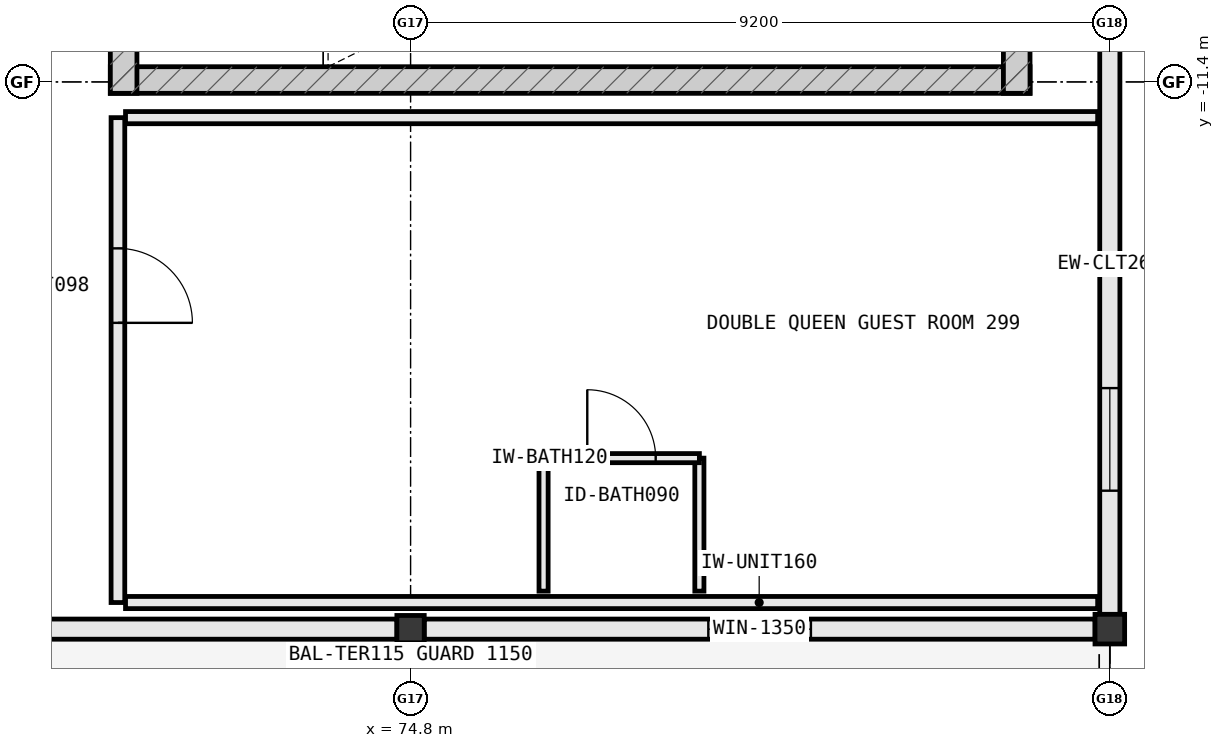
"""IFC4 building model, lengths in metres.
Left out: names, types, materials, properties, quantities, classifications, styles, units other than length and angle.
Written with IfcOpenShell. Run it as: python <this file> out.ifc"""

import sys

from ifc_helpers import new_model, si_unit, direction, frame, frame_2d, origin, origin_2d, place, context, subcontext, project, spatial, rectangle, extrude, element, fill, save


model = new_model("IFC4")
c1 = context("Model", 3, precision=1e-05, world=origin(), true_north=direction((0.0, 1.0)))
c2 = subcontext(c1, "Body", "Model", "MODEL_VIEW")
j1 = project(units=[si_unit("LENGTHUNIT", "METRE"), si_unit("PLANEANGLEUNIT", "RADIAN")], contexts=[c1])
p1 = place(None, origin())
s1 = spatial("IfcSite", under=j1, at=p1, CompositionType="ELEMENT")
p2 = place(p1, origin())
s2 = spatial("IfcBuilding", under=s1, at=p2, CompositionType="ELEMENT")
p3 = place(p2, frame((0.0, 0.0, 46.6)))
s3 = spatial("IfcBuildingStorey", under=s2, at=p3, CompositionType="ELEMENT", Elevation=46.6)
p4 = place(p3, frame((74.8, -18.6, 0.0), z_axis=(0.0, 0.0, 1.0), x_axis=(1.0, 0.0, 0.0)))
e1 = element("IfcColumn", 1, at=p4, inside=s3, PredefinedType="COLUMN", context=c2, shape_type="SweptSolid", body=[
    extrude(rectangle(XDim=0.36, YDim=0.36, at=origin_2d()), origin(), (0.0, 0.0, 1.0), 4.2),
])
p5 = place(p3, frame((84.0, -18.6, 0.0), z_axis=(0.0, 0.0, 1.0), x_axis=(1.0, 0.0, 0.0)))
e2 = element("IfcColumn", 2, at=p5, inside=s3, PredefinedType="COLUMN", context=c2, shape_type="SweptSolid", body=[
    extrude(rectangle(XDim=0.39, YDim=0.39, at=origin_2d()), origin(), (0.0, 0.0, 1.0), 4.2),
])
p6 = place(p3, frame((65.808, -18.6, 0.0), z_axis=(0.0, 0.0, 1.0), x_axis=(1.0, 0.0, 0.0)))
e3 = element("IfcWall", 3, at=p6, inside=s3, PredefinedType="STANDARD", context=c2, shape_type="SweptSolid", body=[
    extrude(rectangle(XDim=8.814, YDim=0.265, at=frame_2d((4.407, 0.0))), origin(), (0.0, 0.0, 1.0), 3.99),
])
p7 = place(p6, frame((2.392, 0.0, 0.0)))
e4 = element("IfcOpeningElement", 4, at=p7, cuts=e3, PredefinedType="OPENING", context=c2, shape_type="SweptSolid", body=[
    extrude(rectangle(XDim=1.5, YDim=2.22, at=frame_2d((0.75, 1.11))), frame((0.0, 0.145, 0.0), z_axis=(0.0, -1.0, 0.0), x_axis=(1.0, 0.0, 0.0)), (0.0, 0.0, 1.0), 0.289),
])
p8 = place(p3, frame((74.978, -18.6, 0.0), z_axis=(0.0, 0.0, 1.0), x_axis=(1.0, 0.0, 0.0)))
e5 = element("IfcWall", 5, at=p8, inside=s3, PredefinedType="STANDARD", context=c2, shape_type="SweptSolid", body=[
    extrude(rectangle(XDim=8.829, YDim=0.265, at=frame_2d((4.415, 0.0))), origin(), (0.0, 0.0, 1.0), 3.99),
])
p9 = place(p8, frame((3.74, 0.0, 0.85)))
e6 = element("IfcOpeningElement", 6, at=p9, cuts=e5, PredefinedType="OPENING", context=c2, shape_type="SweptSolid", body=[
    extrude(rectangle(XDim=1.35, YDim=1.65, at=frame_2d((0.675, 0.825))), frame((0.0, 0.145, 0.0), z_axis=(0.0, -1.0, 0.0), x_axis=(1.0, 0.0, 0.0)), (0.0, 0.0, 1.0), 0.289),
])
p10 = place(p3, frame((84.0, -18.407, 0.0), z_axis=(0.0, 0.0, 1.0), x_axis=(0.0, 1.0, 0.0)))
e7 = element("IfcWall", 7, at=p10, inside=s3, PredefinedType="STANDARD", context=c2, shape_type="SweptSolid", body=[
    extrude(rectangle(XDim=9.214, YDim=0.265, at=frame_2d((4.607, 0.0))), origin(), (0.0, 0.0, 1.0), 3.99),
])
p11 = place(p10, frame((1.628, 0.0, 0.85)))
e8 = element("IfcOpeningElement", 8, at=p11, cuts=e7, PredefinedType="OPENING", context=c2, shape_type="SweptSolid", body=[
    extrude(rectangle(XDim=1.35, YDim=1.65, at=frame_2d((0.675, 0.825))), frame((0.0, 0.145, 0.0), z_axis=(0.0, -1.0, 0.0), x_axis=(1.0, 0.0, 0.0)), (0.0, 0.0, 1.0), 0.289),
])
p12 = place(p3, frame((70.85, -11.375, 0.0), z_axis=(0.0, 0.0, 1.0), x_axis=(1.0, 0.0, 0.0)))
e9 = element("IfcWall", 9, at=p12, inside=s3, PredefinedType="SHEAR", context=c2, shape_type="SweptSolid", body=[
    extrude(rectangle(XDim=12.1, YDim=0.35, at=frame_2d((6.05, 0.0))), origin(), (0.0, 0.0, 1.0), 3.99),
])
p13 = place(p3, frame((82.775, -11.55, 0.0), z_axis=(0.0, 0.0, 1.0), x_axis=(0.0, 1.0, 0.0)))
e10 = element("IfcWall", 10, at=p13, inside=s3, PredefinedType="SHEAR", context=c2, shape_type="SweptSolid", body=[
    extrude(rectangle(XDim=5.1, YDim=0.35, at=frame_2d((2.55, 0.0))), origin(), (0.0, 0.0, 1.0), 3.99),
])
p14 = place(p3, frame((71.025, -6.45, 0.0), z_axis=(0.0, 0.0, 1.0), x_axis=(0.0, -1.0, 0.0)))
e11 = element("IfcWall", 11, at=p14, inside=s3, PredefinedType="SHEAR", context=c2, shape_type="SweptSolid", body=[
    extrude(rectangle(XDim=5.1, YDim=0.35, at=frame_2d((2.55, 0.0))), origin(), (0.0, 0.0, 1.0), 3.99),
])
p15 = place(p14, frame((2.0, 0.0, 0.0)))
e12 = element("IfcOpeningElement", 12, at=p15, cuts=e11, PredefinedType="OPENING", context=c2, shape_type="SweptSolid", body=[
    extrude(rectangle(XDim=1.1, YDim=2.2, at=frame_2d((0.55, 1.1))), frame((0.0, 0.187, 0.0), z_axis=(0.0, -1.0, 0.0), x_axis=(1.0, 0.0, 0.0)), (0.0, 0.0, 1.0), 0.374),
])
p16 = place(p3, frame((70.95, -11.87, 0.0), z_axis=(0.0, 0.0, 1.0), x_axis=(0.0, -1.0, 0.0)))
e13 = element("IfcWall", 13, at=p16, inside=s3, PredefinedType="PARTITIONING", context=c2, shape_type="SweptSolid", body=[
    extrude(rectangle(XDim=6.38, YDim=0.18, at=frame_2d((3.19, 0.0))), origin(), (0.0, 0.0, 1.0), 3.99),
])
p17 = place(p16, frame((1.72, 0.0, 0.0)))
e14 = element("IfcOpeningElement", 14, at=p17, cuts=e13, PredefinedType="OPENING", context=c2, shape_type="SweptSolid", body=[
    extrude(rectangle(XDim=0.98, YDim=2.18, at=frame_2d((0.49, 1.09))), frame((0.0, 0.102, 0.0), z_axis=(0.0, -1.0, 0.0), x_axis=(1.0, 0.0, 0.0)), (0.0, 0.0, 1.0), 0.204),
])
for number, where, z_axis, x_axis in (
    (15, (71.05, -18.25, 0.0), (0.0, 0.0, 1.0), (1.0, 0.0, 0.0)),
    (16, (71.05, -11.87, 0.0), (0.0, 0.0, 1.0), (1.0, 0.0, 0.0)),
):
    element("IfcWall", number, at=place(p3, frame(where, z_axis=z_axis, x_axis=x_axis)), inside=s3, PredefinedType="PARTITIONING", context=c2, shape_type="SweptSolid", body=[
        extrude(rectangle(XDim=12.79, YDim=0.16, at=frame_2d((6.395, 0.0))), origin(), (0.0, 0.0, 1.0), 3.99),
    ])
for number, where, z_axis, x_axis in (
    (17, (76.55, -18.1, 0.0), (0.0, 0.0, 1.0), (0.0, 1.0, 0.0)),
    (18, (78.6, -18.1, 0.0), (0.0, 0.0, 1.0), (0.0, 1.0, 0.0)),
):
    element("IfcWall", number, at=place(p3, frame(where, z_axis=z_axis, x_axis=x_axis)), inside=s3, PredefinedType="PARTITIONING", context=c2, shape_type="SweptSolid", body=[
        extrude(rectangle(XDim=1.75, YDim=0.12, at=frame_2d((0.875, 0.0))), origin(), (0.0, 0.0, 1.0), 3.99),
    ])
p18 = place(p3, frame((76.55, -16.35, 0.0), z_axis=(0.0, 0.0, 1.0), x_axis=(1.0, 0.0, 0.0)))
e19 = element("IfcWall", 19, at=p18, inside=s3, PredefinedType="PARTITIONING", context=c2, shape_type="SweptSolid", body=[
    extrude(rectangle(XDim=2.05, YDim=0.12, at=frame_2d((1.025, 0.0))), origin(), (0.0, 0.0, 1.0), 3.99),
])
p19 = place(p18, frame((0.575, 0.0, 0.0)))
e20 = element("IfcOpeningElement", 20, at=p19, cuts=e19, PredefinedType="OPENING", context=c2, shape_type="SweptSolid", body=[
    extrude(rectangle(XDim=0.9, YDim=2.15, at=frame_2d((0.45, 1.075))), frame((0.0, 0.072, 0.0), z_axis=(0.0, -1.0, 0.0), x_axis=(1.0, 0.0, 0.0)), (0.0, 0.0, 1.0), 0.144),
])
p20 = place(p9, origin())
e21 = element("IfcWindow", 21, at=p20, inside=s3, PartitioningType="SINGLE_PANEL", PredefinedType="WINDOW", context=c2, shape_type="SweptSolid", body=[
    extrude(rectangle(XDim=1.35, YDim=1.65, at=frame_2d((0.675, 0.825))), frame((0.0, 0.03, 0.0), z_axis=(0.0, -1.0, 0.0), x_axis=(1.0, 0.0, 0.0)), (0.0, 0.0, 1.0), 0.06),
])
fill(e6, e21)
p21 = place(p11, origin())
e22 = element("IfcWindow", 22, at=p21, inside=s3, PartitioningType="SINGLE_PANEL", PredefinedType="WINDOW", context=c2, shape_type="SweptSolid", body=[
    extrude(rectangle(XDim=1.35, YDim=1.65, at=frame_2d((0.675, 0.825))), frame((0.0, 0.03, 0.0), z_axis=(0.0, -1.0, 0.0), x_axis=(1.0, 0.0, 0.0)), (0.0, 0.0, 1.0), 0.06),
])
fill(e8, e22)
p22 = place(p17, origin())
e23 = element("IfcDoor", 23, at=p22, inside=s3, OperationType="SINGLE_SWING_RIGHT", PredefinedType="DOOR", context=c2, shape_type="SweptSolid", body=[
    extrude(rectangle(XDim=0.98, YDim=2.18, at=frame_2d((0.49, 1.09))), frame((0.0, 0.025, 0.0), z_axis=(0.0, -1.0, 0.0), x_axis=(1.0, 0.0, 0.0)), (0.0, 0.0, 1.0), 0.05),
])
fill(e14, e23)
p23 = place(p19, origin())
e24 = element("IfcDoor", 24, at=p23, inside=s3, OperationType="SINGLE_SWING_LEFT", PredefinedType="DOOR", context=c2, shape_type="SweptSolid", body=[
    extrude(rectangle(XDim=0.9, YDim=2.15, at=frame_2d((0.45, 1.075))), frame((0.0, 0.025, 0.0), z_axis=(0.0, -1.0, 0.0), x_axis=(1.0, 0.0, 0.0)), (0.0, 0.0, 1.0), 0.05),
])
fill(e20, e24)
save(model, sys.argv[1])
